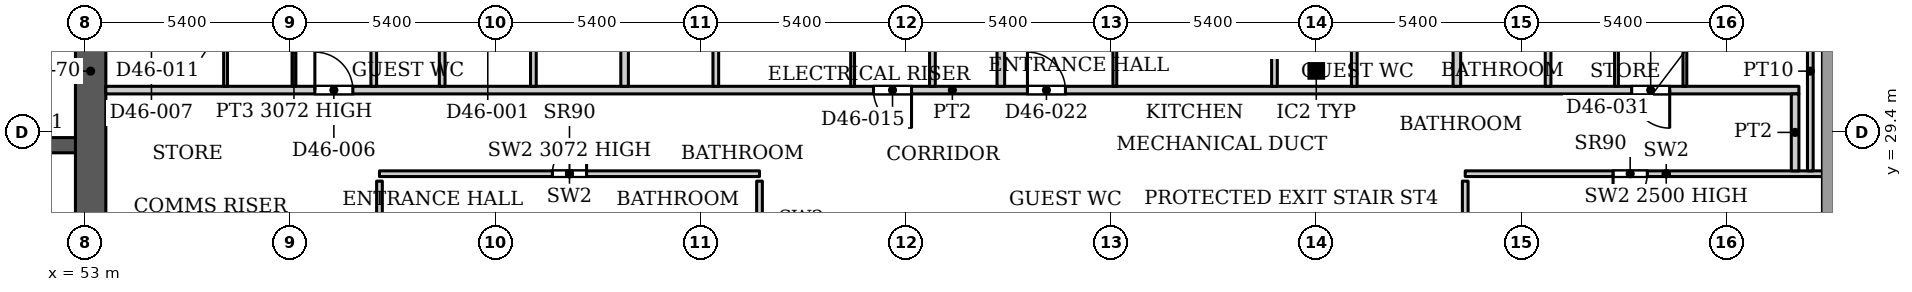
"""IFC4 building model, lengths in metres.
Left out: names, types, materials, properties, quantities, classifications, styles, units other than length and angle.
Written with IfcOpenShell. Run it as: python <this file> out.ifc"""

import sys

from ifc_helpers import new_model, si_unit, direction, frame, frame_2d, origin, origin_2d, place, context, subcontext, project, spatial, rectangle, hollow_rectangle, extrude, source, transform, mapped, element, fill, save


model = new_model("IFC4")
c1 = context("Model", 3, precision=1e-05, world=origin(), true_north=direction((0.0, 1.0)))
c2 = subcontext(c1, "Body", "Model", "MODEL_VIEW")
j1 = project(units=[si_unit("LENGTHUNIT", "METRE"), si_unit("PLANEANGLEUNIT", "RADIAN")], contexts=[c1])
p1 = place(None, origin())
s1 = spatial("IfcSite", under=j1, at=p1, CompositionType="ELEMENT")
p2 = place(p1, origin())
s2 = spatial("IfcBuilding", under=s1, at=p2, CompositionType="ELEMENT")
p3 = place(p2, frame((0.0, 0.0, 195.5)))
s3 = spatial("IfcBuildingStorey", under=s2, at=p3, CompositionType="ELEMENT", Elevation=195.5)
p4 = place(p3, frame((85.4, 31.005, 0.0), z_axis=(0.0, 0.0, 1.0), x_axis=(1.0, 0.0, 0.0)))
e1 = element("IfcColumn", 1, at=p4, inside=s3, PredefinedType="COLUMN", context=c2, shape_type="SweptSolid", body=[
    extrude(hollow_rectangle(XDim=0.305, YDim=0.305, WallThickness=0.016, InnerFilletRadius=0.016, OuterFilletRadius=0.032, at=origin_2d()), origin(), (0.0, 0.0, 1.0), 3.9),
])
p5 = place(p3, frame((34.75, 29.05, 0.0), z_axis=(0.0, 0.0, 1.0), x_axis=(1.0, 0.0, 0.0)))
e2 = element("IfcWall", 2, at=p5, inside=s3, PredefinedType="SHEAR", context=c2, shape_type="SweptSolid", body=[
    extrude(rectangle(XDim=18.4, YDim=0.4, at=frame_2d((9.2, 0.0))), origin(), (0.0, 0.0, 1.0), 3.9),
])
p6 = place(p5, frame((0.875, 0.0, 0.0)))
e3 = element("IfcOpeningElement", 3, at=p6, cuts=e2, PredefinedType="OPENING", context=c2, shape_type="SweptSolid", body=[
    extrude(rectangle(XDim=1.1, YDim=2.2, at=frame_2d((0.55, 1.1))), frame((0.0, 0.21, 0.0), z_axis=(0.0, -1.0, 0.0), x_axis=(1.0, 0.0, 0.0)), (0.0, 0.0, 1.0), 0.42),
])
p7 = place(p5, frame((3.725, 0.0, 0.0)))
e4 = element("IfcOpeningElement", 4, at=p7, cuts=e2, PredefinedType="OPENING", context=c2, shape_type="SweptSolid", body=[
    extrude(rectangle(XDim=1.1, YDim=2.2, at=frame_2d((0.55, 1.1))), frame((0.0, 0.21, 0.0), z_axis=(0.0, -1.0, 0.0), x_axis=(1.0, 0.0, 0.0)), (0.0, 0.0, 1.0), 0.42),
])
p8 = place(p5, frame((6.575, 0.0, 0.0)))
e5 = element("IfcOpeningElement", 5, at=p8, cuts=e2, PredefinedType="OPENING", context=c2, shape_type="SweptSolid", body=[
    extrude(rectangle(XDim=1.1, YDim=2.2, at=frame_2d((0.55, 1.1))), frame((0.0, 0.21, 0.0), z_axis=(0.0, -1.0, 0.0), x_axis=(1.0, 0.0, 0.0)), (0.0, 0.0, 1.0), 0.42),
])
p9 = place(p5, frame((9.425, 0.0, 0.0)))
e6 = element("IfcOpeningElement", 6, at=p9, cuts=e2, PredefinedType="OPENING", context=c2, shape_type="SweptSolid", body=[
    extrude(rectangle(XDim=1.1, YDim=2.2, at=frame_2d((0.55, 1.1))), frame((0.0, 0.21, 0.0), z_axis=(0.0, -1.0, 0.0), x_axis=(1.0, 0.0, 0.0)), (0.0, 0.0, 1.0), 0.42),
])
p10 = place(p5, frame((12.275, 0.0, 0.0)))
e7 = element("IfcOpeningElement", 7, at=p10, cuts=e2, PredefinedType="OPENING", context=c2, shape_type="SweptSolid", body=[
    extrude(rectangle(XDim=1.1, YDim=2.2, at=frame_2d((0.55, 1.1))), frame((0.0, 0.21, 0.0), z_axis=(0.0, -1.0, 0.0), x_axis=(1.0, 0.0, 0.0)), (0.0, 0.0, 1.0), 0.42),
])
p11 = place(p5, frame((15.125, 0.0, 0.0)))
e8 = element("IfcOpeningElement", 8, at=p11, cuts=e2, PredefinedType="OPENING", context=c2, shape_type="SweptSolid", body=[
    extrude(rectangle(XDim=1.1, YDim=2.2, at=frame_2d((0.55, 1.1))), frame((0.0, 0.21, 0.0), z_axis=(0.0, -1.0, 0.0), x_axis=(1.0, 0.0, 0.0)), (0.0, 0.0, 1.0), 0.42),
])
p12 = place(p3, frame((53.15, 25.8, 0.0), z_axis=(0.0, 0.0, 1.0), x_axis=(0.0, 1.0, 0.0)))
e9 = element("IfcWall", 9, at=p12, inside=s3, PredefinedType="SHEAR", context=c2, shape_type="SweptSolid", body=[
    extrude(rectangle(XDim=10.4, YDim=0.8, at=frame_2d((5.2, 0.0))), origin(), (0.0, 0.0, 1.0), 3.9),
])
p13 = place(p3, frame((60.75, 28.3, 0.0), z_axis=(0.0, 0.0, 1.0), x_axis=(1.0, 0.0, 0.0)))
e10 = element("IfcWall", 10, at=p13, inside=s3, PredefinedType="PARTITIONING", context=c2, shape_type="SweptSolid", body=[
    extrude(rectangle(XDim=10.0, YDim=0.15, at=frame_2d((5.0, 0.0))), origin(), (0.0, 0.0, 1.0), 3.072),
])
p14 = place(p13, frame((4.55, 0.0, 0.0)))
e11 = element("IfcOpeningElement", 11, at=p14, cuts=e10, PredefinedType="OPENING", context=c2, shape_type="SweptSolid", body=[
    extrude(rectangle(XDim=0.9, YDim=2.2, at=frame_2d((0.45, 1.1))), frame((0.0, 0.085, 0.0), z_axis=(0.0, -1.0, 0.0), x_axis=(1.0, 0.0, 0.0)), (0.0, 0.0, 1.0), 0.17),
])
p15 = place(p3, frame((60.75, 23.075, 0.0), z_axis=(0.0, 0.0, 1.0), x_axis=(0.0, 1.0, 0.0)))
e12 = element("IfcWall", 12, at=p15, inside=s3, PredefinedType="PARTITIONING", context=c2, shape_type="SweptSolid", body=[
    extrude(rectangle(XDim=5.03, YDim=0.15, at=frame_2d((2.515, 0.0))), origin(), (0.0, 0.0, 1.0), 3.9),
])
p16 = place(p3, frame((70.75, 26.12, 0.0), z_axis=(0.0, 0.0, 1.0), x_axis=(0.0, 1.0, 0.0)))
e13 = element("IfcWall", 13, at=p16, inside=s3, PredefinedType="PARTITIONING", context=c2, shape_type="SweptSolid", body=[
    extrude(rectangle(XDim=1.985, YDim=0.15, at=frame_2d((0.992, 0.0))), origin(), (0.0, 0.0, 1.0), 3.9),
])
p17 = place(p3, frame((89.32, 28.3, 0.0), z_axis=(0.0, 0.0, 1.0), x_axis=(1.0, 0.0, 0.0)))
e14 = element("IfcWall", 14, at=p17, inside=s3, PredefinedType="PARTITIONING", context=c2, shape_type="SweptSolid", body=[
    extrude(rectangle(XDim=10.578, YDim=0.15, at=frame_2d((5.289, 0.0))), origin(), (0.0, 0.0, 1.0), 2.5),
])
p18 = place(p17, frame((3.89, 0.0, 0.0)))
e15 = element("IfcOpeningElement", 15, at=p18, cuts=e14, PredefinedType="OPENING", context=c2, shape_type="SweptSolid", body=[
    extrude(rectangle(XDim=0.9, YDim=2.2, at=frame_2d((0.45, 1.1))), frame((0.0, 0.085, 0.0), z_axis=(0.0, -1.0, 0.0), x_axis=(1.0, 0.0, 0.0)), (0.0, 0.0, 1.0), 0.17),
])
p19 = place(p3, frame((89.32, 25.62, 0.0), z_axis=(0.0, 0.0, 1.0), x_axis=(0.0, 1.0, 0.0)))
e16 = element("IfcWall", 16, at=p19, inside=s3, PredefinedType="PARTITIONING", context=c2, shape_type="SweptSolid", body=[
    extrude(rectangle(XDim=2.485, YDim=0.15, at=frame_2d((1.242, 0.0))), origin(), (0.0, 0.0, 1.0), 3.9),
])
p20 = place(p3, frame((53.549, 30.5, 0.0), z_axis=(0.0, 0.0, 1.0), x_axis=(1.0, 0.0, 0.0)))
e17 = element("IfcWall", 17, at=p20, inside=s3, PredefinedType="PARTITIONING", context=c2, shape_type="SweptSolid", body=[
    extrude(rectangle(XDim=44.551, YDim=0.2, at=frame_2d((22.275, 0.0))), origin(), (0.0, 0.0, 1.0), 3.6),
])
p21 = place(p20, frame((5.501, 0.0, 0.0)))
e18 = element("IfcOpeningElement", 18, at=p21, cuts=e17, PredefinedType="OPENING", context=c2, shape_type="SweptSolid", body=[
    extrude(rectangle(XDim=1.0, YDim=2.1, at=frame_2d((0.5, 1.05))), frame((0.0, 0.11, 0.0), z_axis=(0.0, -1.0, 0.0), x_axis=(1.0, 0.0, 0.0)), (0.0, 0.0, 1.0), 0.22),
])
p22 = place(p20, frame((20.201, 0.0, 0.0)))
e19 = element("IfcOpeningElement", 19, at=p22, cuts=e17, PredefinedType="OPENING", context=c2, shape_type="SweptSolid", body=[
    extrude(rectangle(XDim=1.0, YDim=2.1, at=frame_2d((0.5, 1.05))), frame((0.0, 0.11, 0.0), z_axis=(0.0, -1.0, 0.0), x_axis=(1.0, 0.0, 0.0)), (0.0, 0.0, 1.0), 0.22),
])
p23 = place(p20, frame((24.251, 0.0, 0.0)))
e20 = element("IfcOpeningElement", 20, at=p23, cuts=e17, PredefinedType="OPENING", context=c2, shape_type="SweptSolid", body=[
    extrude(rectangle(XDim=1.0, YDim=2.1, at=frame_2d((0.5, 1.05))), frame((0.0, 0.11, 0.0), z_axis=(0.0, -1.0, 0.0), x_axis=(1.0, 0.0, 0.0)), (0.0, 0.0, 1.0), 0.22),
])
p24 = place(p20, frame((40.151, 0.0, 0.0)))
e21 = element("IfcOpeningElement", 21, at=p24, cuts=e17, PredefinedType="OPENING", context=c2, shape_type="SweptSolid", body=[
    extrude(rectangle(XDim=1.0, YDim=2.1, at=frame_2d((0.5, 1.05))), frame((0.0, 0.11, 0.0), z_axis=(0.0, -1.0, 0.0), x_axis=(1.0, 0.0, 0.0)), (0.0, 0.0, 1.0), 0.22),
])
p25 = place(p3, frame((56.7, 30.6, 0.0), z_axis=(0.0, 0.0, 1.0), x_axis=(0.0, 1.0, 0.0)))
e22 = element("IfcWall", 22, at=p25, inside=s3, PredefinedType="PARTITIONING", context=c2, shape_type="SweptSolid", body=[
    extrude(rectangle(XDim=3.05, YDim=0.1, at=frame_2d((1.525, 0.0))), origin(), (0.0, 0.0, 1.0), 3.6),
])
p26 = place(p3, frame((58.5, 30.6, 0.0), z_axis=(0.0, 0.0, 1.0), x_axis=(0.0, 1.0, 0.0)))
e23 = element("IfcWall", 23, at=p26, inside=s3, PredefinedType="PARTITIONING", context=c2, shape_type="SweptSolid", body=[
    extrude(rectangle(XDim=3.05, YDim=0.1, at=frame_2d((1.525, 0.0))), origin(), (0.0, 0.0, 1.0), 3.072),
])
for number, where, z_axis, x_axis in (
    (24, (60.6, 30.6, 0.0), (0.0, 0.0, 1.0), (0.0, 1.0, 0.0)),
    (25, (62.4, 30.6, 0.0), (0.0, 0.0, 1.0), (0.0, 1.0, 0.0)),
    (26, (64.8, 30.6, 0.0), (0.0, 0.0, 1.0), (0.0, 1.0, 0.0)),
):
    element("IfcWall", number, at=place(p3, frame(where, z_axis=z_axis, x_axis=x_axis)), inside=s3, PredefinedType="PARTITIONING", context=c2, shape_type="SweptSolid", body=[
        extrude(rectangle(XDim=3.025, YDim=0.15, at=frame_2d((1.512, 0.0))), origin(), (0.0, 0.0, 1.0), 3.6),
    ])
p27 = place(p3, frame((67.2, 30.6, 0.0), z_axis=(0.0, 0.0, 1.0), x_axis=(0.0, 1.0, 0.0)))
e27 = element("IfcWall", 27, at=p27, inside=s3, PredefinedType="PARTITIONING", context=c2, shape_type="SweptSolid", body=[
    extrude(rectangle(XDim=13.3, YDim=0.2, at=frame_2d((6.65, 0.0))), origin(), (0.0, 0.0, 1.0), 3.6),
])
p28 = place(p3, frame((69.6, 30.6, 0.0), z_axis=(0.0, 0.0, 1.0), x_axis=(0.0, 1.0, 0.0)))
e28 = element("IfcWall", 28, at=p28, inside=s3, PredefinedType="PARTITIONING", context=c2, shape_type="SweptSolid", body=[
    extrude(rectangle(XDim=3.025, YDim=0.15, at=frame_2d((1.512, 0.0))), origin(), (0.0, 0.0, 1.0), 3.6),
])
p29 = place(p3, frame((73.2, 30.6, 0.0), z_axis=(0.0, 0.0, 1.0), x_axis=(0.0, 1.0, 0.0)))
e29 = element("IfcWall", 29, at=p29, inside=s3, PredefinedType="PARTITIONING", context=c2, shape_type="SweptSolid", body=[
    extrude(rectangle(XDim=3.025, YDim=0.1, at=frame_2d((1.512, 0.0))), origin(), (0.0, 0.0, 1.0), 3.6),
])
p30 = place(p3, frame((75.3, 30.6, 0.0), z_axis=(0.0, 0.0, 1.0), x_axis=(0.0, 1.0, 0.0)))
e30 = element("IfcWall", 30, at=p30, inside=s3, PredefinedType="PARTITIONING", context=c2, shape_type="SweptSolid", body=[
    extrude(rectangle(XDim=3.175, YDim=0.15, at=frame_2d((1.587, 0.0))), origin(), (0.0, 0.0, 1.0), 3.6),
])
p31 = place(p3, frame((77.1, 30.6, 0.0), z_axis=(0.0, 0.0, 1.0), x_axis=(0.0, 1.0, 0.0)))
e31 = element("IfcWall", 31, at=p31, inside=s3, PredefinedType="PARTITIONING", context=c2, shape_type="SweptSolid", body=[
    extrude(rectangle(XDim=13.3, YDim=0.2, at=frame_2d((6.65, 0.0))), origin(), (0.0, 0.0, 1.0), 3.6),
])
p32 = place(p3, frame((80.1, 30.6, 0.0), z_axis=(0.0, 0.0, 1.0), x_axis=(0.0, 1.0, 0.0)))
e32 = element("IfcWall", 32, at=p32, inside=s3, PredefinedType="PARTITIONING", context=c2, shape_type="SweptSolid", body=[
    extrude(rectangle(XDim=3.025, YDim=0.1, at=frame_2d((1.512, 0.0))), origin(), (0.0, 0.0, 1.0), 3.6),
])
for number, where, z_axis, x_axis in (
    (33, (84.3, 30.6, 0.0), (0.0, 0.0, 1.0), (0.0, 1.0, 0.0)),
    (34, (86.4, 30.6, 0.0), (0.0, 0.0, 1.0), (0.0, 1.0, 0.0)),
):
    element("IfcWall", number, at=place(p3, frame(where, z_axis=z_axis, x_axis=x_axis)), inside=s3, PredefinedType="PARTITIONING", context=c2, shape_type="SweptSolid", body=[
        extrude(rectangle(XDim=3.025, YDim=0.15, at=frame_2d((1.512, 0.0))), origin(), (0.0, 0.0, 1.0), 3.6),
    ])
p33 = place(p3, frame((89.1, 30.6, 0.0), z_axis=(0.0, 0.0, 1.0), x_axis=(0.0, 1.0, 0.0)))
e35 = element("IfcWall", 35, at=p33, inside=s3, PredefinedType="PARTITIONING", context=c2, shape_type="SweptSolid", body=[
    extrude(rectangle(XDim=13.3, YDim=0.2, at=frame_2d((6.65, 0.0))), origin(), (0.0, 0.0, 1.0), 3.6),
])
p34 = place(p3, frame((91.5, 30.6, 0.0), z_axis=(0.0, 0.0, 1.0), x_axis=(0.0, 1.0, 0.0)))
e36 = element("IfcWall", 36, at=p34, inside=s3, PredefinedType="PARTITIONING", context=c2, shape_type="SweptSolid", body=[
    extrude(rectangle(XDim=3.025, YDim=0.15, at=frame_2d((1.512, 0.0))), origin(), (0.0, 0.0, 1.0), 3.6),
])
for number, where, z_axis, x_axis in (
    (37, (93.3, 30.6, 0.0), (0.0, 0.0, 1.0), (0.0, 1.0, 0.0)),
    (38, (95.1, 30.6, 0.0), (0.0, 0.0, 1.0), (0.0, 1.0, 0.0)),
):
    element("IfcWall", number, at=place(p3, frame(where, z_axis=z_axis, x_axis=x_axis)), inside=s3, PredefinedType="PARTITIONING", context=c2, shape_type="SweptSolid", body=[
        extrude(rectangle(XDim=3.025, YDim=0.1, at=frame_2d((1.512, 0.0))), origin(), (0.0, 0.0, 1.0), 3.6),
    ])
p35 = place(p3, frame((98.0, 28.374, 0.0), z_axis=(0.0, 0.0, 1.0), x_axis=(0.0, 1.0, 0.0)))
e39 = element("IfcWall", 39, at=p35, inside=s3, PredefinedType="PARTITIONING", context=c2, shape_type="SweptSolid", body=[
    extrude(rectangle(XDim=2.026, YDim=0.2, at=frame_2d((1.013, 0.0))), origin(), (0.0, 0.0, 1.0), 3.6),
])
p36 = place(p3, frame((98.4, 28.374, 0.0), z_axis=(0.0, 0.0, 1.0), x_axis=(0.0, 1.0, 0.0)))
e40 = element("IfcWall", 40, at=p36, inside=s3, PredefinedType="PARTITIONING", context=c2, shape_type="SweptSolid", body=[
    extrude(rectangle(XDim=5.251, YDim=0.15, at=frame_2d((2.625, 0.0))), origin(), (0.0, 0.0, 1.0), 3.6),
])
m1 = source(origin(), c2, "Body", "SweptSolid", [
    extrude(rectangle(XDim=0.9, YDim=2.2, at=frame_2d((0.45, 1.1))), frame((0.0, 0.025, 0.0), z_axis=(0.0, -1.0, 0.0), x_axis=(1.0, 0.0, 0.0)), (0.0, 0.0, 1.0), 0.05),
])
p37 = place(p14, origin())
e41 = element("IfcDoor", 41, at=p37, inside=s3, OperationType="SINGLE_SWING_LEFT", PredefinedType="DOOR", context=c2, shape_type="MappedRepresentation", body=[
    mapped(m1, transform((0.0, 0.0, 0.0), x_axis=(1.0, 0.0, 0.0), y_axis=(0.0, 1.0, 0.0), z_axis=(0.0, 0.0, 1.0), scale=1.0)),
])
fill(e11, e41)
p38 = place(p18, origin())
e42 = element("IfcDoor", 42, at=p38, inside=s3, OperationType="SINGLE_SWING_RIGHT", PredefinedType="DOOR", context=c2, shape_type="MappedRepresentation", body=[
    mapped(m1, transform((0.0, 0.0, 0.0), x_axis=(1.0, 0.0, 0.0), y_axis=(0.0, 1.0, 0.0), z_axis=(0.0, 0.0, 1.0), scale=1.0)),
])
fill(e15, e42)
m2 = source(origin(), c2, "Body", "SweptSolid", [
    extrude(rectangle(XDim=1.0, YDim=2.1, at=frame_2d((0.5, 1.05))), frame((0.0, 0.025, 0.0), z_axis=(0.0, -1.0, 0.0), x_axis=(1.0, 0.0, 0.0)), (0.0, 0.0, 1.0), 0.05),
])
p39 = place(p21, origin())
e43 = element("IfcDoor", 43, at=p39, inside=s3, OperationType="SINGLE_SWING_LEFT", PredefinedType="DOOR", context=c2, shape_type="MappedRepresentation", body=[
    mapped(m2, transform((0.0, 0.0, 0.0), x_axis=(1.0, 0.0, 0.0), y_axis=(0.0, 1.0, 0.0), z_axis=(0.0, 0.0, 1.0), scale=1.0)),
])
fill(e18, e43)
p40 = place(p22, origin())
e44 = element("IfcDoor", 44, at=p40, inside=s3, OperationType="SINGLE_SWING_RIGHT", PredefinedType="DOOR", context=c2, shape_type="MappedRepresentation", body=[
    mapped(m2, transform((0.0, 0.0, 0.0), x_axis=(1.0, 0.0, 0.0), y_axis=(0.0, 1.0, 0.0), z_axis=(0.0, 0.0, 1.0), scale=1.0)),
])
fill(e19, e44)
p41 = place(p23, origin())
e45 = element("IfcDoor", 45, at=p41, inside=s3, OperationType="SINGLE_SWING_LEFT", PredefinedType="DOOR", context=c2, shape_type="MappedRepresentation", body=[
    mapped(m2, transform((0.0, 0.0, 0.0), x_axis=(1.0, 0.0, 0.0), y_axis=(0.0, 1.0, 0.0), z_axis=(0.0, 0.0, 1.0), scale=1.0)),
])
fill(e20, e45)
p42 = place(p24, origin())
e46 = element("IfcDoor", 46, at=p42, inside=s3, OperationType="SINGLE_SWING_RIGHT", PredefinedType="DOOR", context=c2, shape_type="MappedRepresentation", body=[
    mapped(m2, transform((0.0, 0.0, 0.0), x_axis=(1.0, 0.0, 0.0), y_axis=(0.0, 1.0, 0.0), z_axis=(0.0, 0.0, 1.0), scale=1.0)),
])
fill(e21, e46)
save(model, sys.argv[1])
